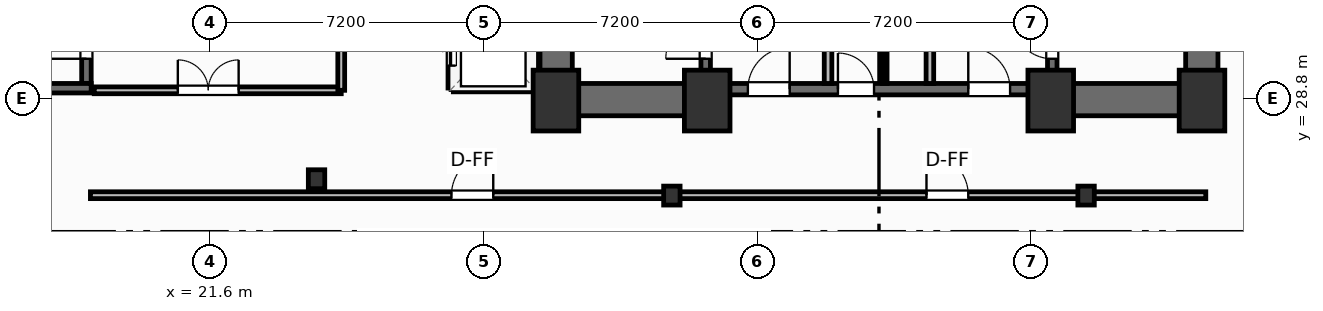
"""IFC4 building model, lengths in metres.
Left out: names, types, materials, properties, quantities, classifications, styles, units other than length and angle.
Written with IfcOpenShell. Run it as: python <this file> out.ifc"""

import sys

from ifc_helpers import new_model, si_unit, direction, frame, frame_2d, origin, origin_2d, place, context, subcontext, project, spatial, rectangle, i_section, extrude, element, fill, save


model = new_model("IFC4")
c1 = context("Model", 3, precision=1e-05, world=origin(), true_north=direction((0.0, 1.0)))
c2 = subcontext(c1, "Body", "Model", "MODEL_VIEW")
j1 = project(units=[si_unit("LENGTHUNIT", "METRE"), si_unit("PLANEANGLEUNIT", "RADIAN")], contexts=[c1])
p1 = place(None, origin())
s1 = spatial("IfcSite", under=j1, at=p1, CompositionType="ELEMENT")
p2 = place(p1, origin())
s2 = spatial("IfcBuilding", under=s1, at=p2, CompositionType="ELEMENT")
p3 = place(p2, frame((0.0, 0.0, -4.5)))
s3 = spatial("IfcBuildingStorey", under=s2, at=p3, CompositionType="ELEMENT", Elevation=-4.5)
for number, where, z_axis, x_axis in (
    (1, (30.7, 28.75, 0.0), (0.0, 0.0, 1.0), (1.0, 0.0, 0.0)),
    (2, (34.68, 28.75, 0.0), (0.0, 0.0, 1.0), (1.0, 0.0, 0.0)),
    (3, (43.72, 28.75, 0.0), (0.0, 0.0, 1.0), (1.0, 0.0, 0.0)),
    (4, (47.7, 28.75, 0.0), (0.0, 0.0, 1.0), (1.0, 0.0, 0.0)),
):
    element("IfcColumn", number, at=place(p3, frame(where, z_axis=z_axis, x_axis=x_axis)), inside=s3, PredefinedType="COLUMN", context=c2, shape_type="SweptSolid", body=[
        extrude(rectangle(XDim=1.2, YDim=1.6, at=origin_2d()), origin(), (0.0, 0.0, 1.0), 4.5),
    ])
for number, where, z_axis, x_axis in (
    (5, (33.75, 26.25, 0.0), (0.0, 0.0, 1.0), (1.0, 0.0, 0.0)),
    (6, (44.65, 26.25, 0.0), (0.0, 0.0, 1.0), (1.0, 0.0, 0.0)),
    (7, (24.4, 26.68, 0.0), (0.0, 0.0, 1.0), (1.0, 0.0, 0.0)),
):
    element("IfcColumn", number, at=place(p3, frame(where, z_axis=z_axis, x_axis=x_axis)), inside=s3, PredefinedType="COLUMN", context=c2, shape_type="SweptSolid", body=[
        extrude(i_section(OverallWidth=0.432, OverallDepth=0.498, WebThickness=0.056, FlangeThickness=0.089, FilletRadius=0.025, at=origin_2d()), origin(), (0.0, 0.0, 1.0), 4.5),
    ])
for number, where, z_axis, x_axis in (
    (8, (30.705, 29.2, 0.0), (0.0, 0.0, 1.0), (0.0, 1.0, 0.0)),
    (9, (47.695, 29.2, 0.0), (0.0, 0.0, 1.0), (0.0, 1.0, 0.0)),
):
    element("IfcWall", number, at=place(p3, frame(where, z_axis=z_axis, x_axis=x_axis)), inside=s3, PredefinedType="SHEAR", context=c2, shape_type="SweptSolid", body=[
        extrude(rectangle(XDim=9.22, YDim=0.85, at=frame_2d((4.61, 0.0))), origin(), (0.0, 0.0, 1.0), 4.18),
    ])
for number, where, z_axis, x_axis in (
    (10, (30.28, 28.775, 0.0), (0.0, 0.0, 1.0), (1.0, 0.0, 0.0)),
    (11, (43.6, 28.775, 0.0), (0.0, 0.0, 1.0), (1.0, 0.0, 0.0)),
):
    element("IfcWall", number, at=place(p3, frame(where, z_axis=z_axis, x_axis=x_axis)), inside=s3, PredefinedType="SHEAR", context=c2, shape_type="SweptSolid", body=[
        extrude(rectangle(XDim=4.52, YDim=0.85, at=frame_2d((2.26, 0.0))), origin(), (0.0, 0.0, 1.0), 4.18),
    ])
p4 = place(p3, frame((34.8, 29.05, 0.0), z_axis=(0.0, 0.0, 1.0), x_axis=(1.0, 0.0, 0.0)))
e12 = element("IfcWall", 12, at=p4, inside=s3, PredefinedType="SHEAR", context=c2, shape_type="SweptSolid", body=[
    extrude(rectangle(XDim=8.8, YDim=0.3, at=frame_2d((4.4, 0.0))), origin(), (0.0, 0.0, 1.0), 4.18),
])
p5 = place(p4, frame((0.95, 0.0, 0.0)))
e13 = element("IfcOpeningElement", 13, at=p5, cuts=e12, PredefinedType="OPENING", context=c2, shape_type="SweptSolid", body=[
    extrude(rectangle(XDim=1.1, YDim=2.15, at=frame_2d((0.55, 1.075))), frame((0.0, 0.16, 0.0), z_axis=(0.0, -1.0, 0.0), x_axis=(1.0, 0.0, 0.0)), (0.0, 0.0, 1.0), 0.32),
])
p6 = place(p4, frame((6.75, 0.0, 0.0)))
e14 = element("IfcOpeningElement", 14, at=p6, cuts=e12, PredefinedType="OPENING", context=c2, shape_type="SweptSolid", body=[
    extrude(rectangle(XDim=1.1, YDim=2.15, at=frame_2d((0.55, 1.075))), frame((0.0, 0.16, 0.0), z_axis=(0.0, -1.0, 0.0), x_axis=(1.0, 0.0, 0.0)), (0.0, 0.0, 1.0), 0.32),
])
p7 = place(p4, frame((3.32, 0.0, 0.0)))
e15 = element("IfcOpeningElement", 15, at=p7, cuts=e12, PredefinedType="OPENING", context=c2, shape_type="SweptSolid", body=[
    extrude(rectangle(XDim=0.95, YDim=2.15, at=frame_2d((0.475, 1.075))), frame((0.0, 0.16, 0.0), z_axis=(0.0, -1.0, 0.0), x_axis=(1.0, 0.0, 0.0)), (0.0, 0.0, 1.0), 0.32),
])
p8 = place(p3, frame((34.64, 29.2, 0.0), z_axis=(0.0, 0.0, 1.0), x_axis=(0.0, 1.0, 0.0)))
e16 = element("IfcWall", 16, at=p8, inside=s3, PredefinedType="SHEAR", context=c2, shape_type="SweptSolid", body=[
    extrude(rectangle(XDim=9.22, YDim=0.25, at=frame_2d((4.61, 0.0))), origin(), (0.0, 0.0, 1.0), 4.18),
])
p9 = place(p8, frame((0.65, 0.0, 0.0)))
e17 = element("IfcOpeningElement", 17, at=p9, cuts=e16, PredefinedType="OPENING", context=c2, shape_type="SweptSolid", body=[
    extrude(rectangle(XDim=1.05, YDim=2.15, at=frame_2d((0.525, 1.075))), frame((0.0, 0.135, 0.0), z_axis=(0.0, -1.0, 0.0), x_axis=(1.0, 0.0, 0.0)), (0.0, 0.0, 1.0), 0.27),
])
p10 = place(p3, frame((43.76, 29.2, 0.0), z_axis=(0.0, 0.0, 1.0), x_axis=(0.0, 1.0, 0.0)))
e18 = element("IfcWall", 18, at=p10, inside=s3, PredefinedType="SHEAR", context=c2, shape_type="SweptSolid", body=[
    extrude(rectangle(XDim=9.22, YDim=0.25, at=frame_2d((4.61, 0.0))), origin(), (0.0, 0.0, 1.0), 4.18),
])
p11 = place(p10, frame((0.65, 0.0, 0.0)))
e19 = element("IfcOpeningElement", 19, at=p11, cuts=e18, PredefinedType="OPENING", context=c2, shape_type="SweptSolid", body=[
    extrude(rectangle(XDim=1.05, YDim=2.15, at=frame_2d((0.525, 1.075))), frame((0.0, 0.135, 0.0), z_axis=(0.0, -1.0, 0.0), x_axis=(1.0, 0.0, 0.0)), (0.0, 0.0, 1.0), 0.27),
])
p12 = place(p3, frame((18.345, 29.2, 0.0), z_axis=(0.0, 0.0, 1.0), x_axis=(0.0, 1.0, 0.0)))
e20 = element("IfcWall", 20, at=p12, inside=s3, PredefinedType="SHEAR", context=c2, shape_type="SweptSolid", body=[
    extrude(rectangle(XDim=9.22, YDim=0.25, at=frame_2d((4.61, 0.0))), origin(), (0.0, 0.0, 1.0), 4.18),
])
p13 = place(p12, frame((0.65, 0.0, 0.0)))
e21 = element("IfcOpeningElement", 21, at=p13, cuts=e20, PredefinedType="OPENING", context=c2, shape_type="SweptSolid", body=[
    extrude(rectangle(XDim=1.05, YDim=2.15, at=frame_2d((0.525, 1.075))), frame((0.0, 0.135, 0.0), z_axis=(0.0, -1.0, 0.0), x_axis=(1.0, 0.0, 0.0)), (0.0, 0.0, 1.0), 0.27),
])
p14 = place(p3, frame((14.58, 29.075, 0.0), z_axis=(0.0, 0.0, 1.0), x_axis=(1.0, 0.0, 0.0)))
e22 = element("IfcWall", 22, at=p14, inside=s3, PredefinedType="SHEAR", context=c2, shape_type="SweptSolid", body=[
    extrude(rectangle(XDim=3.89, YDim=0.25, at=frame_2d((1.945, 0.0))), origin(), (0.0, 0.0, 1.0), 4.18),
])
p15 = place(p3, frame((18.45, 26.26, 0.0), z_axis=(0.0, 0.0, 1.0), x_axis=(1.0, 0.0, 0.0)))
e23 = element("IfcWall", 23, at=p15, inside=s3, PredefinedType="PARTITIONING", context=c2, shape_type="SweptSolid", body=[
    extrude(rectangle(XDim=29.35, YDim=0.18, at=frame_2d((14.675, 0.0))), origin(), (0.0, 0.0, 1.0), 3.392),
])
p16 = place(p15, frame((9.5, 0.0, 0.0)))
e24 = element("IfcOpeningElement", 24, at=p16, cuts=e23, PredefinedType="OPENING", context=c2, shape_type="SweptSolid", body=[
    extrude(rectangle(XDim=1.1, YDim=2.15, at=frame_2d((0.55, 1.075))), frame((0.0, 0.1, 0.0), z_axis=(0.0, -1.0, 0.0), x_axis=(1.0, 0.0, 0.0)), (0.0, 0.0, 1.0), 0.2),
])
p17 = place(p15, frame((22.0, 0.0, 0.0)))
e25 = element("IfcOpeningElement", 25, at=p17, cuts=e23, PredefinedType="OPENING", context=c2, shape_type="SweptSolid", body=[
    extrude(rectangle(XDim=1.1, YDim=2.15, at=frame_2d((0.55, 1.075))), frame((0.0, 0.1, 0.0), z_axis=(0.0, -1.0, 0.0), x_axis=(1.0, 0.0, 0.0)), (0.0, 0.0, 1.0), 0.2),
])
p18 = place(p3, frame((18.55, 29.02, 0.0), z_axis=(0.0, 0.0, 1.0), x_axis=(1.0, 0.0, 0.0)))
e26 = element("IfcWall", 26, at=p18, inside=s3, PredefinedType="PARTITIONING", context=c2, shape_type="SweptSolid", body=[
    extrude(rectangle(XDim=6.5, YDim=0.18, at=frame_2d((3.25, 0.0))), origin(), (0.0, 0.0, 1.0), 4.18),
])
p19 = place(p18, frame((2.2, 0.0, 0.0)))
e27 = element("IfcOpeningElement", 27, at=p19, cuts=e26, PredefinedType="OPENING", context=c2, shape_type="SweptSolid", body=[
    extrude(rectangle(XDim=1.6, YDim=2.05, at=frame_2d((0.8, 1.025))), frame((0.0, 0.1, 0.0), z_axis=(0.0, -1.0, 0.0), x_axis=(1.0, 0.0, 0.0)), (0.0, 0.0, 1.0), 0.2),
])
p20 = place(p3, frame((25.05, 29.02, 0.0), z_axis=(0.0, 0.0, 1.0), x_axis=(0.0, 1.0, 0.0)))
e28 = element("IfcWall", 28, at=p20, inside=s3, PredefinedType="PARTITIONING", context=c2, shape_type="SweptSolid", body=[
    extrude(rectangle(XDim=9.43, YDim=0.18, at=frame_2d((4.715, 0.0))), origin(), (0.0, 0.0, 1.0), 4.18),
])
for number, where, z_axis, x_axis in (
    (29, (37.86, 29.2, 0.0), (0.0, 0.0, 1.0), (0.0, 1.0, 0.0)),
    (30, (40.54, 29.2, 0.0), (0.0, 0.0, 1.0), (0.0, 1.0, 0.0)),
):
    element("IfcWall", number, at=place(p3, frame(where, z_axis=z_axis, x_axis=x_axis)), inside=s3, PredefinedType="PARTITIONING", context=c2, shape_type="SweptSolid", body=[
        extrude(rectangle(XDim=5.18, YDim=0.2, at=frame_2d((2.59, 0.0))), origin(), (0.0, 0.0, 1.0), 4.18),
    ])
p21 = place(p3, frame((39.35, 29.2, 0.0), z_axis=(0.0, 0.0, 1.0), x_axis=(0.0, 1.0, 0.0)))
e31 = element("IfcWall", 31, at=p21, inside=s3, PredefinedType="PARTITIONING", context=c2, shape_type="SweptSolid", body=[
    extrude(rectangle(XDim=5.22, YDim=0.125, at=frame_2d((2.61, 0.0))), origin(), (0.0, 0.0, 1.0), 4.18),
])
p22 = place(p21, frame((2.05, 0.0, 0.0)))
e32 = element("IfcOpeningElement", 32, at=p22, cuts=e31, PredefinedType="OPENING", context=c2, shape_type="SweptSolid", body=[
    extrude(rectangle(XDim=0.85, YDim=2.05, at=frame_2d((0.425, 1.025))), frame((0.0, 0.073, 0.0), z_axis=(0.0, -1.0, 0.0), x_axis=(1.0, 0.0, 0.0)), (0.0, 0.0, 1.0), 0.145),
])
p23 = place(p3, frame((28.0, 29.08, 0.0), z_axis=(0.0, 0.0, 1.0), x_axis=(1.0, 0.0, 0.0)))
e33 = element("IfcWall", 33, at=p23, inside=s3, PredefinedType="PARTITIONING", context=c2, shape_type="SweptSolid", body=[
    extrude(rectangle(XDim=2.1, YDim=0.2, at=frame_2d((1.05, 0.0))), origin(), (0.0, 0.0, 1.0), 4.18),
])
p24 = place(p3, frame((30.12, 29.08, 0.0), z_axis=(0.0, 0.0, 1.0), x_axis=(0.0, 1.0, 0.0)))
e34 = element("IfcWall", 34, at=p24, inside=s3, PredefinedType="PARTITIONING", context=c2, shape_type="SweptSolid", body=[
    extrude(rectangle(XDim=6.89, YDim=0.2, at=frame_2d((3.445, 0.0))), origin(), (0.0, 0.0, 1.0), 4.18),
])
p25 = place(p3, frame((27.96, 29.08, 0.0), z_axis=(0.0, 0.0, 1.0), x_axis=(0.0, 1.0, 0.0)))
e35 = element("IfcWall", 35, at=p25, inside=s3, PredefinedType="PARTITIONING", context=c2, shape_type="SweptSolid", body=[
    extrude(rectangle(XDim=6.89, YDim=0.2, at=frame_2d((3.445, 0.0))), origin(), (0.0, 0.0, 1.0), 4.18),
])
p26 = place(p25, frame((0.59, 0.0, 0.0)))
e36 = element("IfcOpeningElement", 36, at=p26, cuts=e35, PredefinedType="OPENING", context=c2, shape_type="SweptSolid", body=[
    extrude(rectangle(XDim=1.1, YDim=2.15, at=frame_2d((0.55, 1.075))), frame((0.0, 0.11, 0.0), z_axis=(0.0, -1.0, 0.0), x_axis=(1.0, 0.0, 0.0)), (0.0, 0.0, 1.0), 0.22),
])
p27 = place(p25, frame((2.89, 0.0, 0.0)))
e37 = element("IfcOpeningElement", 37, at=p27, cuts=e35, PredefinedType="OPENING", context=c2, shape_type="SweptSolid", body=[
    extrude(rectangle(XDim=1.1, YDim=2.15, at=frame_2d((0.55, 1.075))), frame((0.0, 0.11, 0.0), z_axis=(0.0, -1.0, 0.0), x_axis=(1.0, 0.0, 0.0)), (0.0, 0.0, 1.0), 0.22),
])
p28 = place(p25, frame((5.19, 0.0, 0.0)))
e38 = element("IfcOpeningElement", 38, at=p28, cuts=e35, PredefinedType="OPENING", context=c2, shape_type="SweptSolid", body=[
    extrude(rectangle(XDim=1.1, YDim=2.15, at=frame_2d((0.55, 1.075))), frame((0.0, 0.11, 0.0), z_axis=(0.0, -1.0, 0.0), x_axis=(1.0, 0.0, 0.0)), (0.0, 0.0, 1.0), 0.22),
])
p29 = place(p16, origin())
e39 = element("IfcDoor", 39, at=p29, inside=s3, OperationType="SINGLE_SWING_RIGHT", PredefinedType="DOOR", context=c2, shape_type="SweptSolid", body=[
    extrude(rectangle(XDim=1.1, YDim=2.15, at=frame_2d((0.55, 1.075))), frame((0.0, 0.025, 0.0), z_axis=(0.0, -1.0, 0.0), x_axis=(1.0, 0.0, 0.0)), (0.0, 0.0, 1.0), 0.05),
])
fill(e24, e39)
p30 = place(p17, origin())
e40 = element("IfcDoor", 40, at=p30, inside=s3, OperationType="SINGLE_SWING_LEFT", PredefinedType="DOOR", context=c2, shape_type="SweptSolid", body=[
    extrude(rectangle(XDim=1.1, YDim=2.15, at=frame_2d((0.55, 1.075))), frame((0.0, 0.025, 0.0), z_axis=(0.0, -1.0, 0.0), x_axis=(1.0, 0.0, 0.0)), (0.0, 0.0, 1.0), 0.05),
])
fill(e25, e40)
p31 = place(p19, origin())
e41 = element("IfcDoor", 41, at=p31, inside=s3, OperationType="DOUBLE_DOOR_SINGLE_SWING", PredefinedType="DOOR", context=c2, shape_type="SweptSolid", body=[
    extrude(rectangle(XDim=1.6, YDim=2.05, at=frame_2d((0.8, 1.025))), frame((0.0, 0.025, 0.0), z_axis=(0.0, -1.0, 0.0), x_axis=(1.0, 0.0, 0.0)), (0.0, 0.0, 1.0), 0.05),
])
fill(e27, e41)
p32 = place(p9, origin())
e42 = element("IfcDoor", 42, at=p32, inside=s3, OperationType="SINGLE_SWING_LEFT", PredefinedType="DOOR", context=c2, shape_type="SweptSolid", body=[
    extrude(rectangle(XDim=1.05, YDim=2.15, at=frame_2d((0.525, 1.075))), frame((0.0, 0.025, 0.0), z_axis=(0.0, -1.0, 0.0), x_axis=(1.0, 0.0, 0.0)), (0.0, 0.0, 1.0), 0.05),
])
fill(e17, e42)
p33 = place(p11, origin())
e43 = element("IfcDoor", 43, at=p33, inside=s3, OperationType="SINGLE_SWING_RIGHT", PredefinedType="DOOR", context=c2, shape_type="SweptSolid", body=[
    extrude(rectangle(XDim=1.05, YDim=2.15, at=frame_2d((0.525, 1.075))), frame((0.0, 0.025, 0.0), z_axis=(0.0, -1.0, 0.0), x_axis=(1.0, 0.0, 0.0)), (0.0, 0.0, 1.0), 0.05),
])
fill(e19, e43)
p34 = place(p13, origin())
e44 = element("IfcDoor", 44, at=p34, inside=s3, OperationType="SINGLE_SWING_LEFT", PredefinedType="DOOR", context=c2, shape_type="SweptSolid", body=[
    extrude(rectangle(XDim=1.05, YDim=2.15, at=frame_2d((0.525, 1.075))), frame((0.0, 0.025, 0.0), z_axis=(0.0, -1.0, 0.0), x_axis=(1.0, 0.0, 0.0)), (0.0, 0.0, 1.0), 0.05),
])
fill(e21, e44)
p35 = place(p5, origin())
e45 = element("IfcDoor", 45, at=p35, inside=s3, OperationType="SINGLE_SWING_RIGHT", PredefinedType="DOOR", context=c2, shape_type="SweptSolid", body=[
    extrude(rectangle(XDim=1.1, YDim=2.15, at=frame_2d((0.55, 1.075))), frame((0.0, 0.025, 0.0), z_axis=(0.0, -1.0, 0.0), x_axis=(1.0, 0.0, 0.0)), (0.0, 0.0, 1.0), 0.05),
])
fill(e13, e45)
p36 = place(p6, origin())
e46 = element("IfcDoor", 46, at=p36, inside=s3, OperationType="SINGLE_SWING_LEFT", PredefinedType="DOOR", context=c2, shape_type="SweptSolid", body=[
    extrude(rectangle(XDim=1.1, YDim=2.15, at=frame_2d((0.55, 1.075))), frame((0.0, 0.025, 0.0), z_axis=(0.0, -1.0, 0.0), x_axis=(1.0, 0.0, 0.0)), (0.0, 0.0, 1.0), 0.05),
])
fill(e14, e46)
p37 = place(p7, origin())
e47 = element("IfcDoor", 47, at=p37, inside=s3, OperationType="SINGLE_SWING_LEFT", PredefinedType="DOOR", context=c2, shape_type="SweptSolid", body=[
    extrude(rectangle(XDim=0.95, YDim=2.15, at=frame_2d((0.475, 1.075))), frame((0.0, 0.025, 0.0), z_axis=(0.0, -1.0, 0.0), x_axis=(1.0, 0.0, 0.0)), (0.0, 0.0, 1.0), 0.05),
])
fill(e15, e47)
p38 = place(p26, origin())
e48 = element("IfcDoor", 48, at=p38, inside=s3, OperationType="SLIDING_TO_LEFT", PredefinedType="DOOR", context=c2, shape_type="SweptSolid", body=[
    extrude(rectangle(XDim=1.1, YDim=2.15, at=frame_2d((0.55, 1.075))), frame((0.0, 0.025, 0.0), z_axis=(0.0, -1.0, 0.0), x_axis=(1.0, 0.0, 0.0)), (0.0, 0.0, 1.0), 0.05),
])
fill(e36, e48)
save(model, sys.argv[1])
